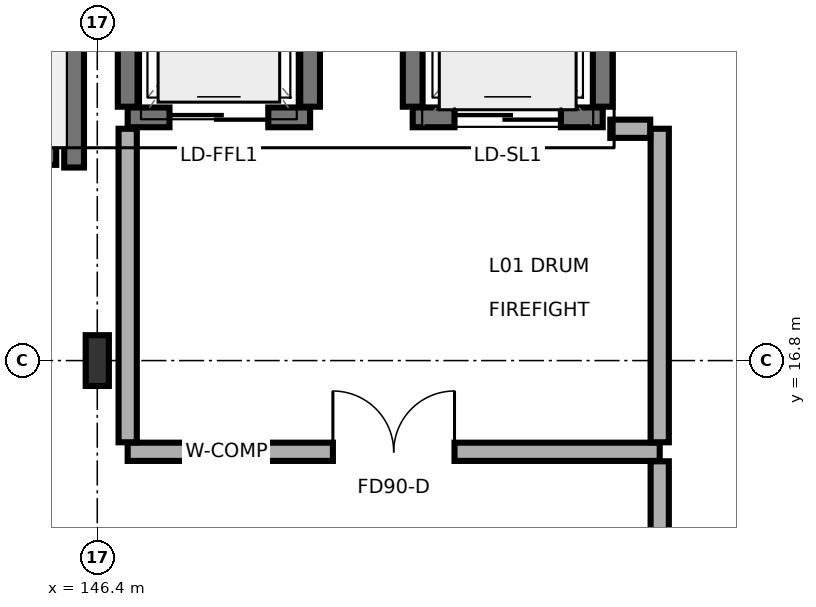
"""IFC4 building model, lengths in metres.
Left out: names, types, materials, properties, quantities, classifications, styles, units other than length and angle.
Written with IfcOpenShell. Run it as: python <this file> out.ifc"""

import sys

from ifc_helpers import new_model, si_unit, direction, frame, frame_2d, origin, origin_2d, place, context, subcontext, project, spatial, rectangle, i_section, extrude, element, fill, save


model = new_model("IFC4")
c1 = context("Model", 3, precision=1e-05, world=origin(), true_north=direction((0.0, 1.0)))
c2 = subcontext(c1, "Body", "Model", "MODEL_VIEW")
j1 = project(units=[si_unit("LENGTHUNIT", "METRE"), si_unit("PLANEANGLEUNIT", "RADIAN")], contexts=[c1])
p1 = place(None, origin())
s1 = spatial("IfcSite", under=j1, at=p1, CompositionType="ELEMENT")
p2 = place(p1, origin())
s2 = spatial("IfcBuilding", under=s1, at=p2, CompositionType="ELEMENT")
p3 = place(p2, origin())
s3 = spatial("IfcBuildingStorey", under=s2, at=p3, CompositionType="ELEMENT", Elevation=0.0)
p4 = place(p3, frame((146.4, 16.8, 0.0), z_axis=(0.0, 0.0, 1.0), x_axis=(1.0, 0.0, 0.0)))
e1 = element("IfcColumn", 1, at=p4, inside=s3, PredefinedType="COLUMN", context=c2, shape_type="SweptSolid", body=[
    extrude(i_section(OverallWidth=0.305, OverallDepth=0.668, WebThickness=0.021, FlangeThickness=0.04, FilletRadius=0.027, at=origin_2d()), origin(), (0.0, 0.0, 1.0), 5.4),
])
p5 = place(p3, frame((146.095, 19.34, 0.0), z_axis=(0.0, 0.0, 1.0), x_axis=(0.0, 1.0, 0.0)))
e2 = element("IfcWall", 2, at=p5, inside=s3, PredefinedType="SHEAR", context=c2, shape_type="SweptSolid", body=[
    extrude(rectangle(XDim=4.27, YDim=0.26, at=frame_2d((2.135, 0.0))), origin(), (0.0, 0.0, 1.0), 5.14),
])
p6 = place(p3, frame((137.34, 19.505, 0.0), z_axis=(0.0, 0.0, 1.0), x_axis=(1.0, 0.0, 0.0)))
e3 = element("IfcWall", 3, at=p6, inside=s3, PredefinedType="SHEAR", context=c2, shape_type="SweptSolid", body=[
    extrude(rectangle(XDim=8.52, YDim=0.26, at=frame_2d((4.26, 0.0))), origin(), (0.0, 0.0, 1.0), 5.14),
])
p7 = place(p3, frame((146.8, 20.0, 0.0), z_axis=(0.0, 0.0, 1.0), x_axis=(1.0, 0.0, 0.0)))
e4 = element("IfcWall", 4, at=p7, inside=s3, PredefinedType="SHEAR", context=c2, shape_type="SweptSolid", body=[
    extrude(rectangle(XDim=2.4, YDim=0.26, at=frame_2d((1.2, 0.0))), origin(), (0.0, 0.0, 1.0), 5.14),
])
p8 = place(p7, frame((0.55, 0.0, 0.0)))
e5 = element("IfcOpeningElement", 5, at=p8, cuts=e4, PredefinedType="OPENING", context=c2, shape_type="SweptSolid", body=[
    extrude(rectangle(XDim=1.3, YDim=2.25, at=frame_2d((0.65, 1.125))), frame((0.0, 0.14, 0.0), z_axis=(0.0, -1.0, 0.0), x_axis=(1.0, 0.0, 0.0)), (0.0, 0.0, 1.0), 0.28),
])
for number, where, z_axis, x_axis in (
    (6, (146.8, 20.14, 0.0), (0.0, 0.0, 1.0), (0.0, 1.0, 0.0)),
    (7, (149.2, 20.14, 0.0), (0.0, 0.0, 1.0), (0.0, 1.0, 0.0)),
):
    element("IfcWall", number, at=place(p3, frame(where, z_axis=z_axis, x_axis=x_axis)), inside=s3, PredefinedType="SHEAR", context=c2, shape_type="SweptSolid", body=[
        extrude(rectangle(XDim=2.52, YDim=0.26, at=frame_2d((1.26, 0.0))), origin(), (0.0, 0.0, 1.0), 5.14),
    ])
p9 = place(p3, frame((150.55, 20.0, 0.0), z_axis=(0.0, 0.0, 1.0), x_axis=(1.0, 0.0, 0.0)))
e8 = element("IfcWall", 8, at=p9, inside=s3, PredefinedType="SHEAR", context=c2, shape_type="SweptSolid", body=[
    extrude(rectangle(XDim=2.5, YDim=0.26, at=frame_2d((1.25, 0.0))), origin(), (0.0, 0.0, 1.0), 5.14),
])
p10 = place(p9, frame((0.55, 0.0, 0.0)))
e9 = element("IfcOpeningElement", 9, at=p10, cuts=e8, PredefinedType="OPENING", context=c2, shape_type="SweptSolid", body=[
    extrude(rectangle(XDim=1.4, YDim=2.3, at=frame_2d((0.7, 1.15))), frame((0.0, 0.14, 0.0), z_axis=(0.0, -1.0, 0.0), x_axis=(1.0, 0.0, 0.0)), (0.0, 0.0, 1.0), 0.28),
])
for number, where, z_axis, x_axis in (
    (10, (150.55, 20.14, 0.0), (0.0, 0.0, 1.0), (0.0, 1.0, 0.0)),
    (11, (153.05, 20.14, 0.0), (0.0, 0.0, 1.0), (0.0, 1.0, 0.0)),
):
    element("IfcWall", number, at=place(p3, frame(where, z_axis=z_axis, x_axis=x_axis)), inside=s3, PredefinedType="SHEAR", context=c2, shape_type="SweptSolid", body=[
        extrude(rectangle(XDim=2.52, YDim=0.26, at=frame_2d((1.26, 0.0))), origin(), (0.0, 0.0, 1.0), 5.14),
    ])
p11 = place(p3, frame((146.8, 15.6, 0.0), z_axis=(0.0, 0.0, 1.0), x_axis=(1.0, 0.0, 0.0)))
e12 = element("IfcWall", 12, at=p11, inside=s3, PredefinedType="SOLIDWALL", context=c2, shape_type="SweptSolid", body=[
    extrude(rectangle(XDim=7.0, YDim=0.24, at=frame_2d((3.5, 0.0))), origin(), (0.0, 0.0, 1.0), 5.14),
])
p12 = place(p11, frame((2.7, 0.0, 0.0)))
e13 = element("IfcOpeningElement", 13, at=p12, cuts=e12, PredefinedType="OPENING", context=c2, shape_type="SweptSolid", body=[
    extrude(rectangle(XDim=1.6, YDim=2.2, at=frame_2d((0.8, 1.1))), frame((0.0, 0.13, 0.0), z_axis=(0.0, -1.0, 0.0), x_axis=(1.0, 0.0, 0.0)), (0.0, 0.0, 1.0), 0.26),
])
for number, where, z_axis, x_axis in (
    (14, (146.8, 15.725, 0.0), (0.0, 0.0, 1.0), (0.0, 1.0, 0.0)),
    (15, (153.8, 15.725, 0.0), (0.0, 0.0, 1.0), (0.0, 1.0, 0.0)),
):
    element("IfcWall", number, at=place(p3, frame(where, z_axis=z_axis, x_axis=x_axis)), inside=s3, PredefinedType="SOLIDWALL", context=c2, shape_type="SweptSolid", body=[
        extrude(rectangle(XDim=4.125, YDim=0.24, at=frame_2d((2.062, 0.0))), origin(), (0.0, 0.0, 1.0), 4.685),
    ])
p13 = place(p3, frame((153.15, 19.85, 0.0), z_axis=(0.0, 0.0, 1.0), x_axis=(1.0, 0.0, 0.0)))
e16 = element("IfcWall", 16, at=p13, inside=s3, PredefinedType="SOLIDWALL", context=c2, shape_type="SweptSolid", body=[
    extrude(rectangle(XDim=0.525, YDim=0.24, at=frame_2d((0.263, 0.0))), origin(), (0.0, 0.0, 1.0), 5.14),
])
p14 = place(p3, frame((153.8, 13.525, 0.0), z_axis=(0.0, 0.0, 1.0), x_axis=(0.0, 1.0, 0.0)))
e17 = element("IfcWall", 17, at=p14, inside=s3, PredefinedType="SOLIDWALL", context=c2, shape_type="SweptSolid", body=[
    extrude(rectangle(XDim=1.95, YDim=0.24, at=frame_2d((0.975, 0.0))), origin(), (0.0, 0.0, 1.0), 5.14),
])
p15 = place(p8, origin())
e18 = element("IfcDoor", 18, at=p15, inside=s3, OperationType="SLIDING_TO_RIGHT", PredefinedType="DOOR", context=c2, shape_type="SweptSolid", body=[
    extrude(rectangle(XDim=1.3, YDim=2.25, at=frame_2d((0.65, 1.125))), frame((0.0, 0.025, 0.0), z_axis=(0.0, -1.0, 0.0), x_axis=(1.0, 0.0, 0.0)), (0.0, 0.0, 1.0), 0.05),
])
fill(e5, e18)
p16 = place(p10, origin())
e19 = element("IfcDoor", 19, at=p16, inside=s3, OperationType="SLIDING_TO_LEFT", PredefinedType="DOOR", context=c2, shape_type="SweptSolid", body=[
    extrude(rectangle(XDim=1.4, YDim=2.3, at=frame_2d((0.7, 1.15))), frame((0.0, 0.025, 0.0), z_axis=(0.0, -1.0, 0.0), x_axis=(1.0, 0.0, 0.0)), (0.0, 0.0, 1.0), 0.05),
])
fill(e9, e19)
p17 = place(p12, origin())
e20 = element("IfcDoor", 20, at=p17, inside=s3, OperationType="DOUBLE_DOOR_SINGLE_SWING", PredefinedType="DOOR", context=c2, shape_type="SweptSolid", body=[
    extrude(rectangle(XDim=1.6, YDim=2.2, at=frame_2d((0.8, 1.1))), frame((0.0, 0.025, 0.0), z_axis=(0.0, -1.0, 0.0), x_axis=(1.0, 0.0, 0.0)), (0.0, 0.0, 1.0), 0.05),
])
fill(e13, e20)
save(model, sys.argv[1])
